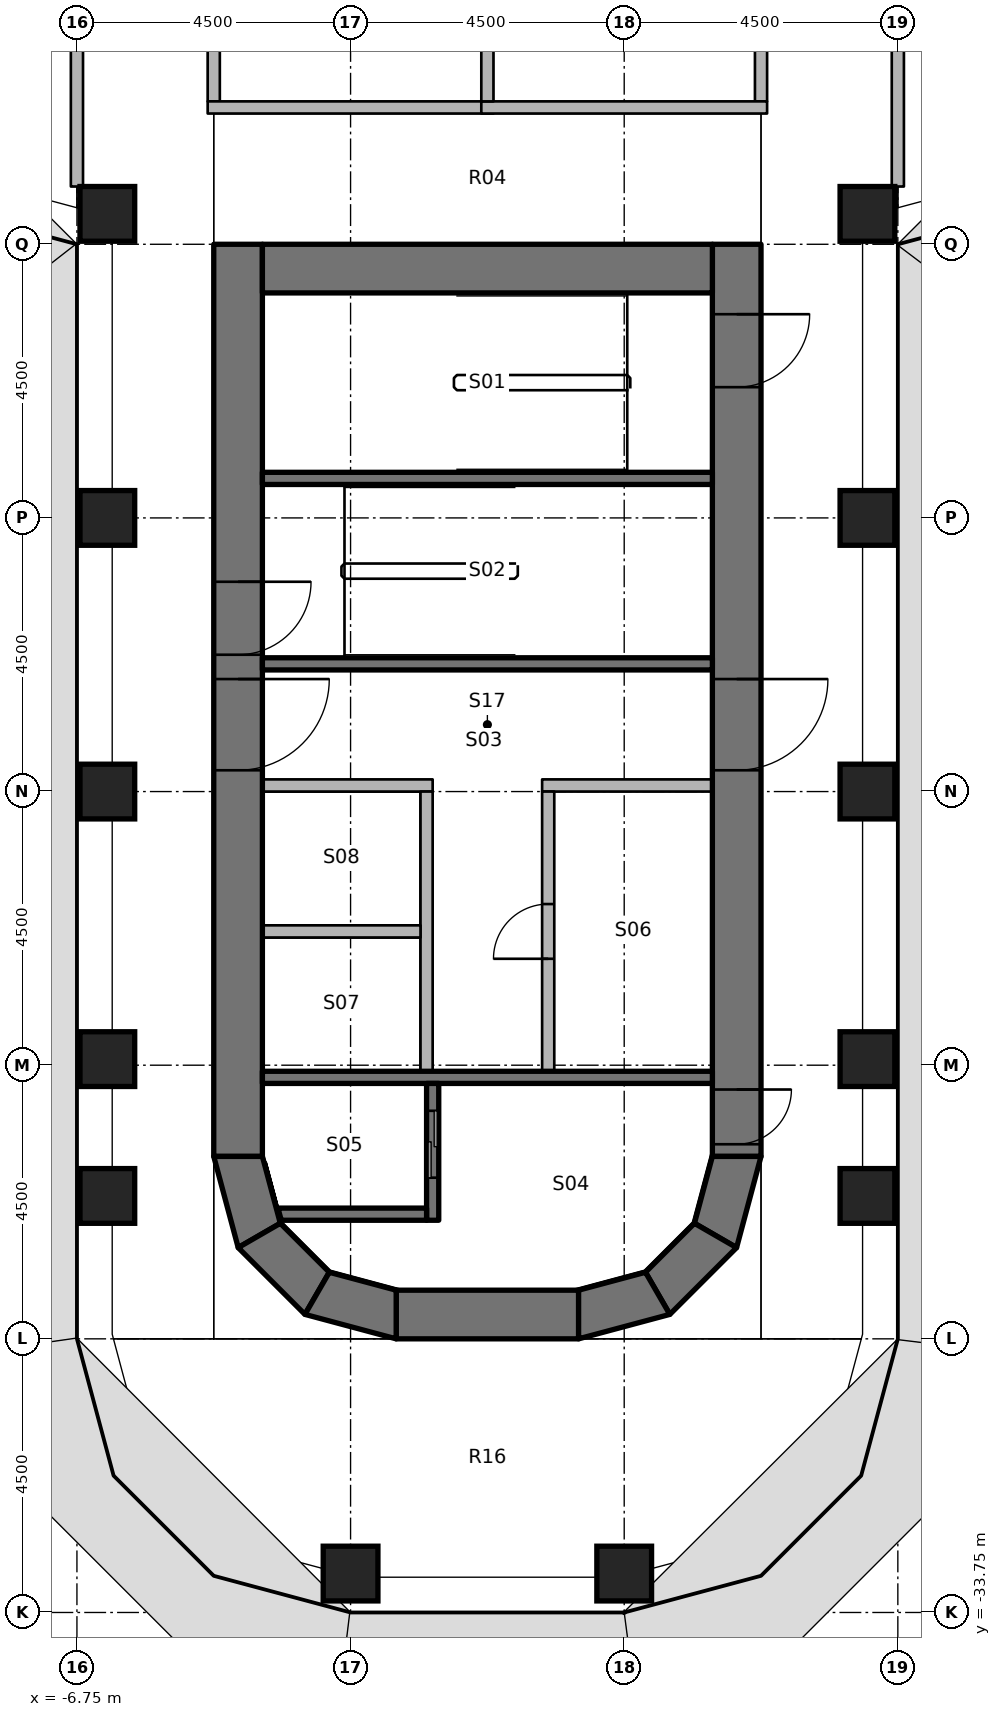
"""IFC4 building model, lengths in metres.
Left out: names, types, materials, properties, quantities, classifications, styles, units other than length and angle.
Written with IfcOpenShell. Run it as: python <this file> out.ifc"""

import sys

from ifc_helpers import new_model, si_unit, direction, frame, frame_2d, origin, origin_2d, place, context, subcontext, project, spatial, polyline, rectangle, outline, extrude, element, fill, save


model = new_model("IFC4")
c1 = context("Model", 3, precision=1e-05, world=origin(), true_north=direction((0.0, 1.0)))
c2 = subcontext(c1, "Body", "Model", "MODEL_VIEW")
j1 = project(units=[si_unit("LENGTHUNIT", "METRE"), si_unit("PLANEANGLEUNIT", "RADIAN")], contexts=[c1])
p1 = place(None, origin())
s1 = spatial("IfcSite", under=j1, at=p1, CompositionType="ELEMENT")
p2 = place(p1, origin())
s2 = spatial("IfcBuilding", under=s1, at=p2, CompositionType="ELEMENT")
p3 = place(p2, frame((0.0, 0.0, 86.6)))
s3 = spatial("IfcBuildingStorey", under=s2, at=p3, CompositionType="ELEMENT", Elevation=86.6)
for number, where, z_axis, x_axis in (
    (1, (-6.25, -26.9, 0.0), (0.0, 0.0, 1.0), (1.0, 0.0, 0.0)),
    (2, (-6.25, -24.65, 0.0), (0.0, 0.0, 1.0), (1.0, 0.0, 0.0)),
    (3, (-6.25, -20.25, 0.0), (0.0, 0.0, 1.0), (1.0, 0.0, 0.0)),
    (4, (-6.25, -15.75, 0.0), (0.0, 0.0, 1.0), (1.0, 0.0, 0.0)),
    (5, (-6.25, -10.75, 0.0), (0.0, 0.0, 1.0), (1.0, 0.0, 0.0)),
    (6, (-2.25, -33.11, 0.0), (0.0, 0.0, 1.0), (1.0, 0.0, 0.0)),
    (7, (2.25, -33.11, 0.0), (0.0, 0.0, 1.0), (1.0, 0.0, 0.0)),
    (8, (6.25, -26.9, 0.0), (0.0, 0.0, 1.0), (1.0, 0.0, 0.0)),
    (9, (6.25, -24.65, 0.0), (0.0, 0.0, 1.0), (1.0, 0.0, 0.0)),
    (10, (6.25, -20.25, 0.0), (0.0, 0.0, 1.0), (1.0, 0.0, 0.0)),
    (11, (6.25, -15.75, 0.0), (0.0, 0.0, 1.0), (1.0, 0.0, 0.0)),
    (12, (6.25, -10.75, 0.0), (0.0, 0.0, 1.0), (1.0, 0.0, 0.0)),
):
    element("IfcColumn", number, at=place(p3, frame(where, z_axis=z_axis, x_axis=x_axis)), inside=s3, PredefinedType="COLUMN", context=c2, shape_type="SweptSolid", body=[
        extrude(rectangle(XDim=0.9, YDim=0.9, at=origin_2d()), origin(), (0.0, 0.0, 1.0), 3.65),
    ])
p4 = place(p3, frame((-4.1, -11.25, 0.0), z_axis=(0.0, 0.0, 1.0), x_axis=(0.0, -1.0, 0.0)))
e13 = element("IfcWall", 13, at=p4, inside=s3, PredefinedType="SHEAR", context=c2, shape_type="SweptSolid", body=[
    extrude(rectangle(XDim=15.0, YDim=0.8, at=frame_2d((7.5, 0.0))), origin(), (0.0, 0.0, 1.0), 3.8),
])
p5 = place(p4, frame((7.15, 0.0, 0.0)))
e14 = element("IfcOpeningElement", 14, at=p5, cuts=e13, PredefinedType="OPENING", context=c2, shape_type="SweptSolid", body=[
    extrude(rectangle(XDim=1.5, YDim=2.3, at=frame_2d((0.75, 1.15))), frame((0.0, 0.41, 0.0), z_axis=(0.0, -1.0, 0.0), x_axis=(1.0, 0.0, 0.0)), (0.0, 0.0, 1.0), 0.82),
])
p6 = place(p4, frame((5.55, 0.0, 0.0)))
e15 = element("IfcOpeningElement", 15, at=p6, cuts=e13, PredefinedType="OPENING", context=c2, shape_type="SweptSolid", body=[
    extrude(rectangle(XDim=1.2, YDim=2.1, at=frame_2d((0.6, 1.05))), frame((0.0, 0.41, 0.0), z_axis=(0.0, -1.0, 0.0), x_axis=(1.0, 0.0, 0.0)), (0.0, 0.0, 1.0), 0.82),
])
p7 = place(p3, frame((4.1, -11.25, 0.0), z_axis=(0.0, 0.0, 1.0), x_axis=(0.0, -1.0, 0.0)))
e16 = element("IfcWall", 16, at=p7, inside=s3, PredefinedType="SHEAR", context=c2, shape_type="SweptSolid", body=[
    extrude(rectangle(XDim=15.0, YDim=0.8, at=frame_2d((7.5, 0.0))), origin(), (0.0, 0.0, 1.0), 3.8),
])
p8 = place(p7, frame((7.15, 0.0, 0.0)))
e17 = element("IfcOpeningElement", 17, at=p8, cuts=e16, PredefinedType="OPENING", context=c2, shape_type="SweptSolid", body=[
    extrude(rectangle(XDim=1.5, YDim=2.3, at=frame_2d((0.75, 1.15))), frame((0.0, 0.41, 0.0), z_axis=(0.0, -1.0, 0.0), x_axis=(1.0, 0.0, 0.0)), (0.0, 0.0, 1.0), 0.82),
])
p9 = place(p7, frame((13.9, 0.0, 0.0)))
e18 = element("IfcOpeningElement", 18, at=p9, cuts=e16, PredefinedType="OPENING", context=c2, shape_type="SweptSolid", body=[
    extrude(rectangle(XDim=0.9, YDim=2.1, at=frame_2d((0.45, 1.05))), frame((0.0, 0.41, 0.0), z_axis=(0.0, -1.0, 0.0), x_axis=(1.0, 0.0, 0.0)), (0.0, 0.0, 1.0), 0.82),
])
p10 = place(p7, frame((1.15, 0.0, 0.0)))
e19 = element("IfcOpeningElement", 19, at=p10, cuts=e16, PredefinedType="OPENING", context=c2, shape_type="SweptSolid", body=[
    extrude(rectangle(XDim=1.2, YDim=2.1, at=frame_2d((0.6, 1.05))), frame((0.0, 0.41, 0.0), z_axis=(0.0, -1.0, 0.0), x_axis=(1.0, 0.0, 0.0)), (0.0, 0.0, 1.0), 0.82),
])
p11 = place(p3, frame((-3.7, -11.65, 0.0), z_axis=(0.0, 0.0, 1.0), x_axis=(1.0, 0.0, 0.0)))
e20 = element("IfcWall", 20, at=p11, inside=s3, PredefinedType="SHEAR", context=c2, shape_type="SweptSolid", body=[
    extrude(rectangle(XDim=7.4, YDim=0.8, at=frame_2d((3.7, 0.0))), origin(), (0.0, 0.0, 1.0), 3.8),
])
p12 = place(p3, frame((-1.5, -28.85, 0.0), z_axis=(0.0, 0.0, 1.0), x_axis=(1.0, 0.0, 0.0)))
e21 = element("IfcWall", 21, at=p12, inside=s3, PredefinedType="SHEAR", context=c2, shape_type="SweptSolid", body=[
    extrude(rectangle(XDim=3.0, YDim=0.8, at=frame_2d((1.5, 0.0))), origin(), (0.0, 0.0, 1.0), 3.8),
])
p13 = place(p3, origin())
e22 = element("IfcWall", 22, at=p13, inside=s3, PredefinedType="SHEAR", context=c2, shape_type="SweptSolid", body=[
    extrude(outline(polyline([(-4.5, -26.25), (-4.098, -27.75), (-3.405, -27.35), (-3.7, -26.25), (-4.5, -26.25)])), origin(), (0.0, 0.0, 1.0), 3.8),
])
p14 = place(p3, origin())
e23 = element("IfcWall", 23, at=p14, inside=s3, PredefinedType="SHEAR", context=c2, shape_type="SweptSolid", body=[
    extrude(outline(polyline([(-4.098, -27.75), (-3.0, -28.848), (-2.6, -28.155), (-3.405, -27.35), (-4.098, -27.75)])), origin(), (0.0, 0.0, 1.0), 3.8),
])
p15 = place(p3, origin())
e24 = element("IfcWall", 24, at=p15, inside=s3, PredefinedType="SHEAR", context=c2, shape_type="SweptSolid", body=[
    extrude(outline(polyline([(-3.0, -28.848), (-1.5, -29.25), (-1.5, -28.45), (-2.6, -28.155), (-3.0, -28.848)])), origin(), (0.0, 0.0, 1.0), 3.8),
])
p16 = place(p3, origin())
e25 = element("IfcWall", 25, at=p16, inside=s3, PredefinedType="SHEAR", context=c2, shape_type="SweptSolid", body=[
    extrude(outline(polyline([(4.5, -26.25), (4.098, -27.75), (3.405, -27.35), (3.7, -26.25), (4.5, -26.25)])), origin(), (0.0, 0.0, 1.0), 3.8),
])
p17 = place(p3, origin())
e26 = element("IfcWall", 26, at=p17, inside=s3, PredefinedType="SHEAR", context=c2, shape_type="SweptSolid", body=[
    extrude(outline(polyline([(4.098, -27.75), (3.0, -28.848), (2.6, -28.155), (3.405, -27.35), (4.098, -27.75)])), origin(), (0.0, 0.0, 1.0), 3.8),
])
p18 = place(p3, origin())
e27 = element("IfcWall", 27, at=p18, inside=s3, PredefinedType="SHEAR", context=c2, shape_type="SweptSolid", body=[
    extrude(outline(polyline([(3.0, -28.848), (1.5, -29.25), (1.5, -28.45), (2.6, -28.155), (3.0, -28.848)])), origin(), (0.0, 0.0, 1.0), 3.8),
])
p19 = place(p3, frame((3.7, -24.95, 0.0), z_axis=(0.0, 0.0, 1.0), x_axis=(-1.0, 0.0, 0.0)))
e28 = element("IfcWall", 28, at=p19, inside=s3, PredefinedType="SHEAR", context=c2, shape_type="SweptSolid", body=[
    extrude(rectangle(XDim=7.4, YDim=0.2, at=frame_2d((3.7, 0.0))), origin(), (0.0, 0.0, 1.0), 3.65),
])
p20 = place(p3, frame((-0.9, -27.3, 0.0), z_axis=(0.0, 0.0, 1.0), x_axis=(0.0, 1.0, 0.0)))
e29 = element("IfcWall", 29, at=p20, inside=s3, PredefinedType="SHEAR", context=c2, shape_type="SweptSolid", body=[
    extrude(rectangle(XDim=2.25, YDim=0.2, at=frame_2d((1.125, 0.0))), origin(), (0.0, 0.0, 1.0), 3.65),
])
p21 = place(p20, frame((0.7, 0.0, 0.0)))
e30 = element("IfcOpeningElement", 30, at=p21, cuts=e29, PredefinedType="OPENING", context=c2, shape_type="SweptSolid", body=[
    extrude(rectangle(XDim=1.1, YDim=2.3, at=frame_2d((0.55, 1.15))), frame((0.0, 0.11, 0.0), z_axis=(0.0, -1.0, 0.0), x_axis=(1.0, 0.0, 0.0)), (0.0, 0.0, 1.0), 0.22),
])
p22 = place(p3, origin())
e31 = element("IfcWall", 31, at=p22, inside=s3, PredefinedType="SHEAR", context=c2, shape_type="SweptSolid", body=[
    extrude(outline(polyline([(-1.0, -27.1), (-3.444, -27.1), (-3.39, -27.3), (-1.0, -27.3), (-1.0, -27.1)])), origin(), (0.0, 0.0, 1.0), 3.65),
])
for number, where, z_axis, x_axis in (
    (32, (3.7, -18.15, 0.0), (0.0, 0.0, 1.0), (-1.0, 0.0, 0.0)),
    (33, (3.7, -15.1, 0.0), (0.0, 0.0, 1.0), (-1.0, 0.0, 0.0)),
):
    element("IfcWall", number, at=place(p3, frame(where, z_axis=z_axis, x_axis=x_axis)), inside=s3, PredefinedType="SHEAR", context=c2, shape_type="SweptSolid", body=[
        extrude(rectangle(XDim=7.4, YDim=0.2, at=frame_2d((3.7, 0.0))), origin(), (0.0, 0.0, 1.0), 3.65),
    ])
p23 = place(p3, frame((3.7, -20.15, 0.0), z_axis=(0.0, 0.0, 1.0), x_axis=(-1.0, 0.0, 0.0)))
e34 = element("IfcWall", 34, at=p23, inside=s3, PredefinedType="PARTITIONING", context=c2, shape_type="SweptSolid", body=[
    extrude(rectangle(XDim=2.8, YDim=0.2, at=frame_2d((1.4, 0.0))), origin(), (0.0, 0.0, 1.0), 3.65),
])
p24 = place(p3, frame((1.0, -24.85, 0.0), z_axis=(0.0, 0.0, 1.0), x_axis=(0.0, 1.0, 0.0)))
e35 = element("IfcWall", 35, at=p24, inside=s3, PredefinedType="PARTITIONING", context=c2, shape_type="SweptSolid", body=[
    extrude(rectangle(XDim=4.6, YDim=0.2, at=frame_2d((2.3, 0.0))), origin(), (0.0, 0.0, 1.0), 3.65),
])
p25 = place(p24, frame((1.85, 0.0, 0.0)))
e36 = element("IfcOpeningElement", 36, at=p25, cuts=e35, PredefinedType="OPENING", context=c2, shape_type="SweptSolid", body=[
    extrude(rectangle(XDim=0.9, YDim=2.1, at=frame_2d((0.45, 1.05))), frame((0.0, 0.11, 0.0), z_axis=(0.0, -1.0, 0.0), x_axis=(1.0, 0.0, 0.0)), (0.0, 0.0, 1.0), 0.22),
])
p26 = place(p3, frame((-0.9, -20.15, 0.0), z_axis=(0.0, 0.0, 1.0), x_axis=(-1.0, 0.0, 0.0)))
e37 = element("IfcWall", 37, at=p26, inside=s3, PredefinedType="PARTITIONING", context=c2, shape_type="SweptSolid", body=[
    extrude(rectangle(XDim=2.8, YDim=0.2, at=frame_2d((1.4, 0.0))), origin(), (0.0, 0.0, 1.0), 3.65),
])
p27 = place(p3, frame((-1.0, -24.85, 0.0), z_axis=(0.0, 0.0, 1.0), x_axis=(0.0, 1.0, 0.0)))
e38 = element("IfcWall", 38, at=p27, inside=s3, PredefinedType="PARTITIONING", context=c2, shape_type="SweptSolid", body=[
    extrude(rectangle(XDim=4.6, YDim=0.2, at=frame_2d((2.3, 0.0))), origin(), (0.0, 0.0, 1.0), 3.65),
])
p28 = place(p3, frame((-1.1, -22.55, 0.0), z_axis=(0.0, 0.0, 1.0), x_axis=(-1.0, 0.0, 0.0)))
e39 = element("IfcWall", 39, at=p28, inside=s3, PredefinedType="PARTITIONING", context=c2, shape_type="SweptSolid", body=[
    extrude(rectangle(XDim=2.6, YDim=0.2, at=frame_2d((1.3, 0.0))), origin(), (0.0, 0.0, 1.0), 3.65),
])
p29 = place(p3, frame((-4.5, 8.9, 0.0), z_axis=(0.0, 0.0, 1.0), x_axis=(0.0, -1.0, 0.0)))
e40 = element("IfcWall", 40, at=p29, inside=s3, PredefinedType="PARTITIONING", context=c2, shape_type="SweptSolid", body=[
    extrude(rectangle(XDim=17.8, YDim=0.2, at=frame_2d((8.9, 0.0))), origin(), (0.0, 0.0, 1.0), 2.738),
])
p30 = place(p29, frame((8.4, 0.0, 0.0)))
e41 = element("IfcOpeningElement", 41, at=p30, cuts=e40, PredefinedType="OPENING", context=c2, shape_type="SweptSolid", body=[
    extrude(rectangle(XDim=1.0, YDim=2.1, at=frame_2d((0.5, 1.05))), frame((0.0, 0.11, 0.0), z_axis=(0.0, -1.0, 0.0), x_axis=(1.0, 0.0, 0.0)), (0.0, 0.0, 1.0), 0.22),
])
p31 = place(p3, frame((-6.75, -10.3, 0.0), z_axis=(0.0, 0.0, 1.0), x_axis=(0.0, 1.0, 0.0)))
e42 = element("IfcWall", 42, at=p31, inside=s3, PredefinedType="PARTITIONING", context=c2, shape_type="SweptSolid", body=[
    extrude(rectangle(XDim=3.6, YDim=0.2, at=frame_2d((1.8, 0.0))), origin(), (0.0, 0.0, 1.0), 2.738),
])
p32 = place(p3, frame((4.5, -8.9, 0.0), z_axis=(0.0, 0.0, 1.0), x_axis=(0.0, 1.0, 0.0)))
e43 = element("IfcWall", 43, at=p32, inside=s3, PredefinedType="PARTITIONING", context=c2, shape_type="SweptSolid", body=[
    extrude(rectangle(XDim=17.8, YDim=0.2, at=frame_2d((8.9, 0.0))), origin(), (0.0, 0.0, 1.0), 2.738),
])
p33 = place(p32, frame((8.4, 0.0, 0.0)))
e44 = element("IfcOpeningElement", 44, at=p33, cuts=e43, PredefinedType="OPENING", context=c2, shape_type="SweptSolid", body=[
    extrude(rectangle(XDim=1.0, YDim=2.1, at=frame_2d((0.5, 1.05))), frame((0.0, 0.11, 0.0), z_axis=(0.0, -1.0, 0.0), x_axis=(1.0, 0.0, 0.0)), (0.0, 0.0, 1.0), 0.22),
])
p34 = place(p3, frame((6.75, -10.3, 0.0), z_axis=(0.0, 0.0, 1.0), x_axis=(0.0, 1.0, 0.0)))
e45 = element("IfcWall", 45, at=p34, inside=s3, PredefinedType="PARTITIONING", context=c2, shape_type="SweptSolid", body=[
    extrude(rectangle(XDim=3.6, YDim=0.2, at=frame_2d((1.8, 0.0))), origin(), (0.0, 0.0, 1.0), 2.738),
])
for number, where, z_axis, x_axis in (
    (46, (-4.6, -9.0, 0.0), (0.0, 0.0, 1.0), (1.0, 0.0, 0.0)),
    (47, (-0.1, -9.0, 0.0), (0.0, 0.0, 1.0), (1.0, 0.0, 0.0)),
):
    element("IfcWall", number, at=place(p3, frame(where, z_axis=z_axis, x_axis=x_axis)), inside=s3, PredefinedType="PARTITIONING", context=c2, shape_type="SweptSolid", body=[
        extrude(rectangle(XDim=4.7, YDim=0.2, at=frame_2d((2.35, 0.0))), origin(), (0.0, 0.0, 1.0), 2.738),
    ])
p35 = place(p3, frame((0.0, -8.9, 0.0), z_axis=(0.0, 0.0, 1.0), x_axis=(0.0, 1.0, 0.0)))
e48 = element("IfcWall", 48, at=p35, inside=s3, PredefinedType="PARTITIONING", context=c2, shape_type="SweptSolid", body=[
    extrude(rectangle(XDim=17.8, YDim=0.2, at=frame_2d((8.9, 0.0))), origin(), (0.0, 0.0, 1.0), 2.738),
])
p36 = place(p8, origin())
e49 = element("IfcDoor", 49, at=p36, inside=s3, OperationType="DOUBLE_DOOR_SINGLE_SWING", PredefinedType="DOOR", context=c2, shape_type="SweptSolid", body=[
    extrude(rectangle(XDim=1.5, YDim=2.3, at=frame_2d((0.75, 1.15))), frame((0.0, 0.025, 0.0), z_axis=(0.0, -1.0, 0.0), x_axis=(1.0, 0.0, 0.0)), (0.0, 0.0, 1.0), 0.05),
])
fill(e17, e49)
p37 = place(p5, origin())
e50 = element("IfcDoor", 50, at=p37, inside=s3, OperationType="DOUBLE_DOOR_SINGLE_SWING", PredefinedType="DOOR", context=c2, shape_type="SweptSolid", body=[
    extrude(rectangle(XDim=1.5, YDim=2.3, at=frame_2d((0.75, 1.15))), frame((0.0, 0.025, 0.0), z_axis=(0.0, -1.0, 0.0), x_axis=(1.0, 0.0, 0.0)), (0.0, 0.0, 1.0), 0.05),
])
fill(e14, e50)
p38 = place(p9, origin())
e51 = element("IfcDoor", 51, at=p38, inside=s3, OperationType="SINGLE_SWING_LEFT", PredefinedType="DOOR", context=c2, shape_type="SweptSolid", body=[
    extrude(rectangle(XDim=0.9, YDim=2.1, at=frame_2d((0.45, 1.05))), frame((0.0, 0.025, 0.0), z_axis=(0.0, -1.0, 0.0), x_axis=(1.0, 0.0, 0.0)), (0.0, 0.0, 1.0), 0.05),
])
fill(e18, e51)
p39 = place(p6, origin())
e52 = element("IfcDoor", 52, at=p39, inside=s3, OperationType="SINGLE_SWING_RIGHT", PredefinedType="DOOR", context=c2, shape_type="SweptSolid", body=[
    extrude(rectangle(XDim=1.2, YDim=2.1, at=frame_2d((0.6, 1.05))), frame((0.0, 0.025, 0.0), z_axis=(0.0, -1.0, 0.0), x_axis=(1.0, 0.0, 0.0)), (0.0, 0.0, 1.0), 0.05),
])
fill(e15, e52)
p40 = place(p10, origin())
e53 = element("IfcDoor", 53, at=p40, inside=s3, OperationType="SINGLE_SWING_LEFT", PredefinedType="DOOR", context=c2, shape_type="SweptSolid", body=[
    extrude(rectangle(XDim=1.2, YDim=2.1, at=frame_2d((0.6, 1.05))), frame((0.0, 0.025, 0.0), z_axis=(0.0, -1.0, 0.0), x_axis=(1.0, 0.0, 0.0)), (0.0, 0.0, 1.0), 0.05),
])
fill(e19, e53)
p41 = place(p21, origin())
e54 = element("IfcDoor", 54, at=p41, inside=s3, OperationType="DOUBLE_DOOR_SLIDING", PredefinedType="DOOR", context=c2, shape_type="SweptSolid", body=[
    extrude(rectangle(XDim=1.1, YDim=2.3, at=frame_2d((0.55, 1.15))), frame((0.0, 0.025, 0.0), z_axis=(0.0, -1.0, 0.0), x_axis=(1.0, 0.0, 0.0)), (0.0, 0.0, 1.0), 0.05),
])
fill(e30, e54)
p42 = place(p25, origin())
e55 = element("IfcDoor", 55, at=p42, inside=s3, OperationType="SINGLE_SWING_LEFT", PredefinedType="DOOR", context=c2, shape_type="SweptSolid", body=[
    extrude(rectangle(XDim=0.9, YDim=2.1, at=frame_2d((0.45, 1.05))), frame((0.0, 0.025, 0.0), z_axis=(0.0, -1.0, 0.0), x_axis=(1.0, 0.0, 0.0)), (0.0, 0.0, 1.0), 0.05),
])
fill(e36, e55)
save(model, sys.argv[1])
